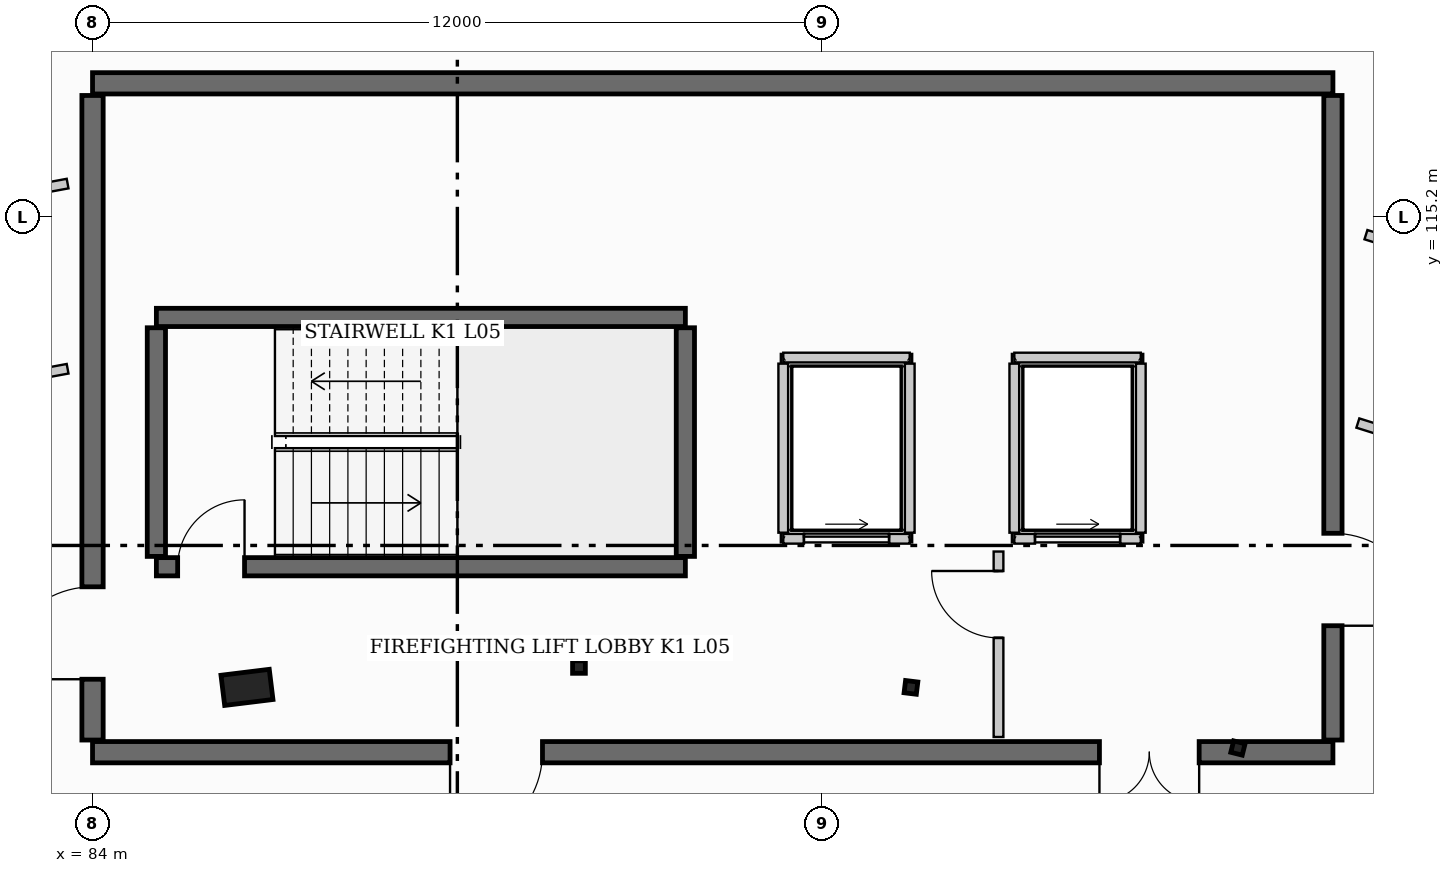
"""IFC4 building model, lengths in metres.
Left out: names, types, materials, properties, quantities, classifications, styles, units other than length and angle.
Written with IfcOpenShell. Run it as: python <this file> out.ifc"""

import sys

from ifc_helpers import new_model, si_unit, direction, frame, frame_2d, origin, origin_2d, place, context, subcontext, project, spatial, rectangle, hollow_circle, i_section, extrude, element, fill, save


model = new_model("IFC4")
c1 = context("Model", 3, precision=1e-05, world=origin(), true_north=direction((0.0, 1.0)))
c2 = subcontext(c1, "Body", "Model", "MODEL_VIEW")
j1 = project(units=[si_unit("LENGTHUNIT", "METRE"), si_unit("PLANEANGLEUNIT", "RADIAN")], contexts=[c1])
p1 = place(None, origin())
s1 = spatial("IfcSite", under=j1, at=p1, CompositionType="ELEMENT")
p2 = place(p1, origin())
s2 = spatial("IfcBuilding", under=s1, at=p2, CompositionType="ELEMENT")
p3 = place(p2, frame((0.0, 0.0, 22.2)))
s3 = spatial("IfcBuildingStorey", under=s2, at=p3, CompositionType="ELEMENT", Elevation=22.2)
p4 = place(p3, frame((86.54, 107.466, 0.0), z_axis=(0.0, 0.0, 1.0), x_axis=(-0.121869343405, 0.992546151641, 0.0)))
e1 = element("IfcColumn", 1, at=p4, inside=s3, PredefinedType="PILASTER", context=c2, shape_type="SweptSolid", body=[
    extrude(rectangle(XDim=0.5, YDim=0.8, at=origin_2d()), origin(), (0.0, 0.0, 1.0), 3.9),
])
p5 = place(p3, frame((92.0, 107.8, 0.0), z_axis=(0.0, 0.0, 1.0), x_axis=(0.0, 1.0, 0.0)))
e2 = element("IfcColumn", 2, at=p5, inside=s3, PredefinedType="COLUMN", context=c2, shape_type="SweptSolid", body=[
    extrude(i_section(OverallWidth=0.205, OverallDepth=0.21, WebThickness=0.009, FlangeThickness=0.014, at=origin_2d()), origin(), (0.0, 0.0, 1.0), 3.9),
])
p6 = place(p3, frame((97.46, 107.466, 0.0), z_axis=(0.0, 0.0, 1.0), x_axis=(0.121869343405, 0.992546151641, 0.0)))
e3 = element("IfcColumn", 3, at=p6, inside=s3, PredefinedType="COLUMN", context=c2, shape_type="SweptSolid", body=[
    extrude(i_section(OverallWidth=0.203, OverallDepth=0.203, WebThickness=0.007, FlangeThickness=0.011, at=origin_2d()), origin(), (0.0, 0.0, 1.0), 3.9),
])
p7 = place(p3, frame((102.838, 106.469, 0.0), z_axis=(0.0, 0.0, 1.0), x_axis=(0.2419218956, 0.970295726276, 0.0)))
e4 = element("IfcColumn", 4, at=p7, inside=s3, PredefinedType="COLUMN", context=c2, shape_type="SweptSolid", body=[
    extrude(hollow_circle(Radius=0.097, WallThickness=0.008, at=origin_2d()), origin(), (0.0, 0.0, 1.0), 3.9),
])
p8 = place(p3, frame((84.0, 117.4, 0.0), z_axis=(0.0, 0.0, 1.0), x_axis=(1.0, 0.0, 0.0)))
e5 = element("IfcWall", 5, at=p8, inside=s3, PredefinedType="SHEAR", context=c2, shape_type="SweptSolid", body=[
    extrude(rectangle(XDim=20.4, YDim=0.35, at=frame_2d((10.2, 0.0))), origin(), (0.0, 0.0, 1.0), 3.9),
])
p9 = place(p3, frame((104.4, 106.4, 0.0), z_axis=(0.0, 0.0, 1.0), x_axis=(-1.0, 0.0, 0.0)))
e6 = element("IfcWall", 6, at=p9, inside=s3, PredefinedType="SHEAR", context=c2, shape_type="SweptSolid", body=[
    extrude(rectangle(XDim=20.4, YDim=0.35, at=frame_2d((10.2, 0.0))), origin(), (0.0, 0.0, 1.0), 3.9),
])
p10 = place(p9, frame((2.2, 0.0, 0.0)))
e7 = element("IfcOpeningElement", 7, at=p10, cuts=e6, PredefinedType="OPENING", context=c2, shape_type="SweptSolid", body=[
    extrude(rectangle(XDim=1.64, YDim=2.2, at=frame_2d((0.82, 1.1))), frame((0.0, 0.185, 0.0), z_axis=(0.0, -1.0, 0.0), x_axis=(1.0, 0.0, 0.0)), (0.0, 0.0, 1.0), 0.37),
])
p11 = place(p9, frame((13.0, 0.0, 0.0)))
e8 = element("IfcOpeningElement", 8, at=p11, cuts=e6, PredefinedType="OPENING", context=c2, shape_type="SweptSolid", body=[
    extrude(rectangle(XDim=1.52, YDim=2.16, at=frame_2d((0.76, 1.08))), frame((0.0, 0.185, 0.0), z_axis=(0.0, -1.0, 0.0), x_axis=(1.0, 0.0, 0.0)), (0.0, 0.0, 1.0), 0.37),
])
p12 = place(p3, frame((84.0, 106.6, 0.0), z_axis=(0.0, 0.0, 1.0), x_axis=(0.0, 1.0, 0.0)))
e9 = element("IfcWall", 9, at=p12, inside=s3, PredefinedType="SHEAR", context=c2, shape_type="SweptSolid", body=[
    extrude(rectangle(XDim=10.6, YDim=0.35, at=frame_2d((5.3, 0.0))), origin(), (0.0, 0.0, 1.0), 3.9),
])
p13 = place(p12, frame((1.0, 0.0, 0.0)))
e10 = element("IfcOpeningElement", 10, at=p13, cuts=e9, PredefinedType="OPENING", context=c2, shape_type="SweptSolid", body=[
    extrude(rectangle(XDim=1.52, YDim=2.16, at=frame_2d((0.76, 1.08))), frame((0.0, 0.185, 0.0), z_axis=(0.0, -1.0, 0.0), x_axis=(1.0, 0.0, 0.0)), (0.0, 0.0, 1.0), 0.37),
])
p14 = place(p3, frame((104.4, 117.2, 0.0), z_axis=(0.0, 0.0, 1.0), x_axis=(0.0, -1.0, 0.0)))
e11 = element("IfcWall", 11, at=p14, inside=s3, PredefinedType="SHEAR", context=c2, shape_type="SweptSolid", body=[
    extrude(rectangle(XDim=10.6, YDim=0.3, at=frame_2d((5.3, 0.0))), origin(), (0.0, 0.0, 1.0), 3.9),
])
p15 = place(p14, frame((7.2, 0.0, 0.0)))
e12 = element("IfcOpeningElement", 12, at=p15, cuts=e11, PredefinedType="OPENING", context=c2, shape_type="SweptSolid", body=[
    extrude(rectangle(XDim=1.52, YDim=2.16, at=frame_2d((0.76, 1.08))), frame((0.0, 0.16, 0.0), z_axis=(0.0, -1.0, 0.0), x_axis=(1.0, 0.0, 0.0)), (0.0, 0.0, 1.0), 0.32),
])
p16 = place(p3, frame((85.05, 109.45, 0.0), z_axis=(0.0, 0.0, 1.0), x_axis=(1.0, 0.0, 0.0)))
e13 = element("IfcWall", 13, at=p16, inside=s3, PredefinedType="SHEAR", context=c2, shape_type="SweptSolid", body=[
    extrude(rectangle(XDim=8.7, YDim=0.3, at=frame_2d((4.35, 0.0))), origin(), (0.0, 0.0, 1.0), 3.9),
])
p17 = place(p16, frame((0.35, 0.0, 0.0)))
e14 = element("IfcOpeningElement", 14, at=p17, cuts=e13, PredefinedType="OPENING", context=c2, shape_type="SweptSolid", body=[
    extrude(rectangle(XDim=1.1, YDim=2.15, at=frame_2d((0.55, 1.075))), frame((0.0, 0.16, 0.0), z_axis=(0.0, -1.0, 0.0), x_axis=(1.0, 0.0, 0.0)), (0.0, 0.0, 1.0), 0.32),
])
p18 = place(p3, frame((93.75, 113.55, 0.0), z_axis=(0.0, 0.0, 1.0), x_axis=(-1.0, 0.0, 0.0)))
e15 = element("IfcWall", 15, at=p18, inside=s3, PredefinedType="SHEAR", context=c2, shape_type="SweptSolid", body=[
    extrude(rectangle(XDim=8.7, YDim=0.3, at=frame_2d((4.35, 0.0))), origin(), (0.0, 0.0, 1.0), 3.9),
])
for number, where, z_axis, x_axis in (
    (16, (85.05, 109.62, 0.0), (0.0, 0.0, 1.0), (0.0, 1.0, 0.0)),
    (17, (93.75, 109.62, 0.0), (0.0, 0.0, 1.0), (0.0, 1.0, 0.0)),
):
    element("IfcWall", number, at=place(p3, frame(where, z_axis=z_axis, x_axis=x_axis)), inside=s3, PredefinedType="SHEAR", context=c2, shape_type="SweptSolid", body=[
        extrude(rectangle(XDim=3.76, YDim=0.3, at=frame_2d((1.88, 0.0))), origin(), (0.0, 0.0, 1.0), 3.9),
    ])
p19 = place(p3, frame((95.36, 109.91, 0.0), z_axis=(0.0, 0.0, 1.0), x_axis=(1.0, 0.0, 0.0)))
e18 = element("IfcWall", 18, at=p19, inside=s3, PredefinedType="PARTITIONING", context=c2, shape_type="SweptSolid", body=[
    extrude(rectangle(XDim=2.08, YDim=0.16, at=frame_2d((1.04, 0.0))), origin(), (0.0, 0.0, 1.0), 3.56),
])
p20 = place(p19, frame((0.34, 0.0, 0.0)))
e19 = element("IfcOpeningElement", 19, at=p20, cuts=e18, PredefinedType="OPENING", context=c2, shape_type="SweptSolid", body=[
    extrude(rectangle(XDim=1.4, YDim=2.2, at=frame_2d((0.7, 1.1))), frame((0.0, 0.09, 0.0), z_axis=(0.0, -1.0, 0.0), x_axis=(1.0, 0.0, 0.0)), (0.0, 0.0, 1.0), 0.18),
])
p21 = place(p3, frame((97.44, 112.89, 0.0), z_axis=(0.0, 0.0, 1.0), x_axis=(-1.0, 0.0, 0.0)))
e20 = element("IfcWall", 20, at=p21, inside=s3, PredefinedType="PARTITIONING", context=c2, shape_type="SweptSolid", body=[
    extrude(rectangle(XDim=2.08, YDim=0.16, at=frame_2d((1.04, 0.0))), origin(), (0.0, 0.0, 1.0), 3.56),
])
for number, where, z_axis, x_axis in (
    (21, (95.36, 112.79, 0.0), (0.0, 0.0, 1.0), (0.0, -1.0, 0.0)),
    (22, (97.44, 110.01, 0.0), (0.0, 0.0, 1.0), (0.0, 1.0, 0.0)),
):
    element("IfcWall", number, at=place(p3, frame(where, z_axis=z_axis, x_axis=x_axis)), inside=s3, PredefinedType="PARTITIONING", context=c2, shape_type="SweptSolid", body=[
        extrude(rectangle(XDim=2.78, YDim=0.16, at=frame_2d((1.39, 0.0))), origin(), (0.0, 0.0, 1.0), 3.56),
    ])
p22 = place(p3, frame((99.16, 109.91, 0.0), z_axis=(0.0, 0.0, 1.0), x_axis=(1.0, 0.0, 0.0)))
e23 = element("IfcWall", 23, at=p22, inside=s3, PredefinedType="PARTITIONING", context=c2, shape_type="SweptSolid", body=[
    extrude(rectangle(XDim=2.08, YDim=0.16, at=frame_2d((1.04, 0.0))), origin(), (0.0, 0.0, 1.0), 3.56),
])
p23 = place(p22, frame((0.34, 0.0, 0.0)))
e24 = element("IfcOpeningElement", 24, at=p23, cuts=e23, PredefinedType="OPENING", context=c2, shape_type="SweptSolid", body=[
    extrude(rectangle(XDim=1.4, YDim=2.2, at=frame_2d((0.7, 1.1))), frame((0.0, 0.09, 0.0), z_axis=(0.0, -1.0, 0.0), x_axis=(1.0, 0.0, 0.0)), (0.0, 0.0, 1.0), 0.18),
])
p24 = place(p3, frame((101.24, 112.89, 0.0), z_axis=(0.0, 0.0, 1.0), x_axis=(-1.0, 0.0, 0.0)))
e25 = element("IfcWall", 25, at=p24, inside=s3, PredefinedType="PARTITIONING", context=c2, shape_type="SweptSolid", body=[
    extrude(rectangle(XDim=2.08, YDim=0.16, at=frame_2d((1.04, 0.0))), origin(), (0.0, 0.0, 1.0), 3.56),
])
for number, where, z_axis, x_axis in (
    (26, (99.16, 112.79, 0.0), (0.0, 0.0, 1.0), (0.0, -1.0, 0.0)),
    (27, (101.24, 110.01, 0.0), (0.0, 0.0, 1.0), (0.0, 1.0, 0.0)),
):
    element("IfcWall", number, at=place(p3, frame(where, z_axis=z_axis, x_axis=x_axis)), inside=s3, PredefinedType="PARTITIONING", context=c2, shape_type="SweptSolid", body=[
        extrude(rectangle(XDim=2.78, YDim=0.16, at=frame_2d((1.39, 0.0))), origin(), (0.0, 0.0, 1.0), 3.56),
    ])
p25 = place(p3, frame((98.9, 106.65, 0.0), z_axis=(0.0, 0.0, 1.0), x_axis=(0.0, 1.0, 0.0)))
e28 = element("IfcWall", 28, at=p25, inside=s3, PredefinedType="PARTITIONING", context=c2, shape_type="SweptSolid", body=[
    extrude(rectangle(XDim=3.05, YDim=0.16, at=frame_2d((1.525, 0.0))), origin(), (0.0, 0.0, 1.0), 3.295),
])
p26 = place(p25, frame((1.63, 0.0, 0.0)))
e29 = element("IfcOpeningElement", 29, at=p26, cuts=e28, PredefinedType="OPENING", context=c2, shape_type="SweptSolid", body=[
    extrude(rectangle(XDim=1.1, YDim=2.15, at=frame_2d((0.55, 1.075))), frame((0.0, 0.09, 0.0), z_axis=(0.0, -1.0, 0.0), x_axis=(1.0, 0.0, 0.0)), (0.0, 0.0, 1.0), 0.18),
])
p27 = place(p3, frame((79.057, 114.911, 0.0), z_axis=(0.0, 0.0, 1.0), x_axis=(0.983258469263, 0.182216307235, 0.0)))
e30 = element("IfcWall", 30, at=p27, inside=s3, PredefinedType="PARTITIONING", context=c2, shape_type="SweptSolid", body=[
    extrude(rectangle(XDim=4.61, YDim=0.16, at=frame_2d((2.305, 0.0))), origin(), (0.0, 0.0, 1.0), 2.938),
])
p28 = place(p27, frame((1.655, 0.0, 0.0)))
e31 = element("IfcOpeningElement", 31, at=p28, cuts=e30, PredefinedType="OPENING", context=c2, shape_type="SweptSolid", body=[
    extrude(rectangle(XDim=1.48, YDim=2.26, at=frame_2d((0.74, 1.13))), frame((0.0, 0.09, 0.0), z_axis=(0.0, -1.0, 0.0), x_axis=(1.0, 0.0, 0.0)), (0.0, 0.0, 1.0), 0.18),
])
p29 = place(p3, frame((79.783, 112.0, 0.0), z_axis=(0.0, 0.0, 1.0), x_axis=(0.983234305922, 0.182346646962, 0.0)))
e32 = element("IfcWall", 32, at=p29, inside=s3, PredefinedType="PARTITIONING", context=c2, shape_type="SweptSolid", body=[
    extrude(rectangle(XDim=3.872, YDim=0.16, at=frame_2d((1.936, 0.0))), origin(), (0.0, 0.0, 1.0), 2.938),
])
p30 = place(p29, frame((1.286, 0.0, 0.0)))
e33 = element("IfcOpeningElement", 33, at=p30, cuts=e32, PredefinedType="OPENING", context=c2, shape_type="SweptSolid", body=[
    extrude(rectangle(XDim=1.36, YDim=2.18, at=frame_2d((0.68, 1.09))), frame((0.0, 0.09, 0.0), z_axis=(0.0, -1.0, 0.0), x_axis=(1.0, 0.0, 0.0)), (0.0, 0.0, 1.0), 0.18),
])
p31 = place(p3, frame((104.943, 114.911, 0.0), z_axis=(0.0, 0.0, 1.0), x_axis=(0.953736183483, -0.30064479426, 0.0)))
e34 = element("IfcWall", 34, at=p31, inside=s3, PredefinedType="PARTITIONING", context=c2, shape_type="SweptSolid", body=[
    extrude(rectangle(XDim=6.532, YDim=0.16, at=frame_2d((3.266, 0.0))), origin(), (0.0, 0.0, 1.0), 3.085),
])
p32 = place(p31, frame((4.632, 0.0, 0.0)))
e35 = element("IfcOpeningElement", 35, at=p32, cuts=e34, PredefinedType="OPENING", context=c2, shape_type="SweptSolid", body=[
    extrude(rectangle(XDim=1.2, YDim=2.12, at=frame_2d((0.6, 1.06))), frame((0.0, 0.09, 0.0), z_axis=(0.0, -1.0, 0.0), x_axis=(1.0, 0.0, 0.0)), (0.0, 0.0, 1.0), 0.18),
])
p33 = place(p3, frame((104.81, 111.813, 0.0), z_axis=(0.0, 0.0, 1.0), x_axis=(0.953730291319, -0.300663485347, 0.0)))
e36 = element("IfcWall", 36, at=p33, inside=s3, PredefinedType="PARTITIONING", context=c2, shape_type="SweptSolid", body=[
    extrude(rectangle(XDim=5.544, YDim=0.16, at=frame_2d((2.772, 0.0))), origin(), (0.0, 0.0, 1.0), 3.088),
])
p34 = place(p33, frame((2.122, 0.0, 0.0)))
e37 = element("IfcOpeningElement", 37, at=p34, cuts=e36, PredefinedType="OPENING", context=c2, shape_type="SweptSolid", body=[
    extrude(rectangle(XDim=1.12, YDim=2.08, at=frame_2d((0.56, 1.04))), frame((0.0, 0.09, 0.0), z_axis=(0.0, -1.0, 0.0), x_axis=(1.0, 0.0, 0.0)), (0.0, 0.0, 1.0), 0.18),
])
p35 = place(p20, origin())
e38 = element("IfcDoor", 38, at=p35, inside=s3, OperationType="SLIDING_TO_LEFT", PredefinedType="DOOR", context=c2, shape_type="SweptSolid", body=[
    extrude(rectangle(XDim=1.4, YDim=2.2, at=frame_2d((0.7, 1.1))), frame((0.0, 0.025, 0.0), z_axis=(0.0, -1.0, 0.0), x_axis=(1.0, 0.0, 0.0)), (0.0, 0.0, 1.0), 0.05),
])
fill(e19, e38)
p36 = place(p23, origin())
e39 = element("IfcDoor", 39, at=p36, inside=s3, OperationType="SLIDING_TO_LEFT", PredefinedType="DOOR", context=c2, shape_type="SweptSolid", body=[
    extrude(rectangle(XDim=1.4, YDim=2.2, at=frame_2d((0.7, 1.1))), frame((0.0, 0.025, 0.0), z_axis=(0.0, -1.0, 0.0), x_axis=(1.0, 0.0, 0.0)), (0.0, 0.0, 1.0), 0.05),
])
fill(e24, e39)
p37 = place(p17, origin())
e40 = element("IfcDoor", 40, at=p37, inside=s3, OperationType="SINGLE_SWING_RIGHT", PredefinedType="DOOR", context=c2, shape_type="SweptSolid", body=[
    extrude(rectangle(XDim=1.1, YDim=2.15, at=frame_2d((0.55, 1.075))), frame((0.0, 0.025, 0.0), z_axis=(0.0, -1.0, 0.0), x_axis=(1.0, 0.0, 0.0)), (0.0, 0.0, 1.0), 0.05),
])
fill(e14, e40)
p38 = place(p10, origin())
e41 = element("IfcDoor", 41, at=p38, inside=s3, OperationType="DOUBLE_DOOR_SINGLE_SWING", PredefinedType="DOOR", context=c2, shape_type="SweptSolid", body=[
    extrude(rectangle(XDim=1.64, YDim=2.2, at=frame_2d((0.82, 1.1))), frame((0.0, 0.025, 0.0), z_axis=(0.0, -1.0, 0.0), x_axis=(1.0, 0.0, 0.0)), (0.0, 0.0, 1.0), 0.05),
])
fill(e7, e41)
p39 = place(p11, origin())
e42 = element("IfcDoor", 42, at=p39, inside=s3, OperationType="SINGLE_SWING_RIGHT", PredefinedType="DOOR", context=c2, shape_type="SweptSolid", body=[
    extrude(rectangle(XDim=1.52, YDim=2.16, at=frame_2d((0.76, 1.08))), frame((0.0, 0.025, 0.0), z_axis=(0.0, -1.0, 0.0), x_axis=(1.0, 0.0, 0.0)), (0.0, 0.0, 1.0), 0.05),
])
fill(e8, e42)
p40 = place(p13, origin())
e43 = element("IfcDoor", 43, at=p40, inside=s3, OperationType="SINGLE_SWING_LEFT", PredefinedType="DOOR", context=c2, shape_type="SweptSolid", body=[
    extrude(rectangle(XDim=1.52, YDim=2.16, at=frame_2d((0.76, 1.08))), frame((0.0, 0.025, 0.0), z_axis=(0.0, -1.0, 0.0), x_axis=(1.0, 0.0, 0.0)), (0.0, 0.0, 1.0), 0.05),
])
fill(e10, e43)
p41 = place(p15, origin())
e44 = element("IfcDoor", 44, at=p41, inside=s3, OperationType="SINGLE_SWING_RIGHT", PredefinedType="DOOR", context=c2, shape_type="SweptSolid", body=[
    extrude(rectangle(XDim=1.52, YDim=2.16, at=frame_2d((0.76, 1.08))), frame((0.0, 0.025, 0.0), z_axis=(0.0, -1.0, 0.0), x_axis=(1.0, 0.0, 0.0)), (0.0, 0.0, 1.0), 0.05),
])
fill(e12, e44)
p42 = place(p26, origin())
e45 = element("IfcDoor", 45, at=p42, inside=s3, OperationType="SINGLE_SWING_RIGHT", PredefinedType="DOOR", context=c2, shape_type="SweptSolid", body=[
    extrude(rectangle(XDim=1.1, YDim=2.15, at=frame_2d((0.55, 1.075))), frame((0.0, 0.025, 0.0), z_axis=(0.0, -1.0, 0.0), x_axis=(1.0, 0.0, 0.0)), (0.0, 0.0, 1.0), 0.05),
])
fill(e29, e45)
save(model, sys.argv[1])
